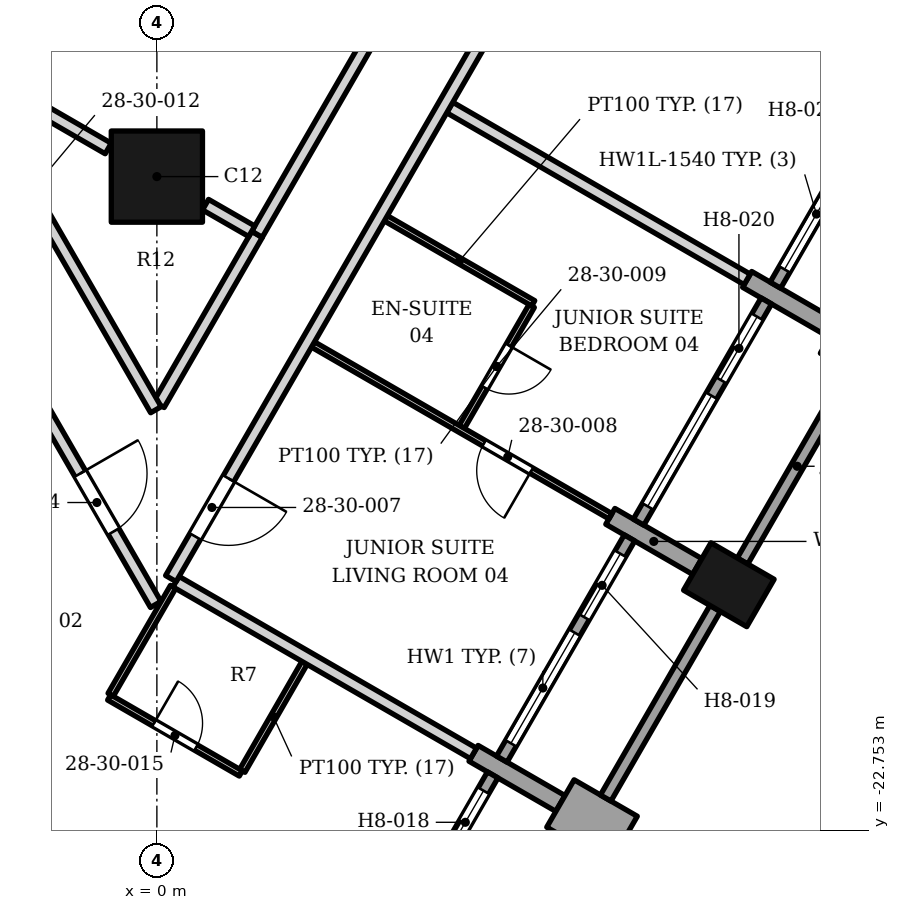
"""IFC4 building model, lengths in metres.
Left out: names, types, materials, properties, quantities, classifications, styles, units other than length and angle.
Written with IfcOpenShell. Run it as: python <this file> out.ifc"""

import sys

from ifc_helpers import new_model, si_unit, direction, frame, frame_2d, origin, origin_2d, place, context, subcontext, project, spatial, rectangle, extrude, element, fill, save


model = new_model("IFC4")
c1 = context("Model", 3, precision=1e-05, world=origin(), true_north=direction((0.0, 1.0)))
c2 = subcontext(c1, "Body", "Model", "MODEL_VIEW")
j1 = project(units=[si_unit("LENGTHUNIT", "METRE"), si_unit("PLANEANGLEUNIT", "RADIAN")], contexts=[c1])
p1 = place(None, origin())
s1 = spatial("IfcSite", under=j1, at=p1, CompositionType="ELEMENT")
p2 = place(p1, origin())
s2 = spatial("IfcBuilding", under=s1, at=p2, CompositionType="ELEMENT")
p3 = place(p2, frame((0.0, 0.0, 122.4)))
s3 = spatial("IfcBuildingStorey", under=s2, at=p3, CompositionType="ELEMENT", Elevation=122.4)
p4 = place(p3, frame((0.0, -12.0, 0.0), z_axis=(0.0, 0.0, 1.0), x_axis=(1.0, 0.0, 0.0)))
e1 = element("IfcColumn", 1, at=p4, inside=s3, PredefinedType="COLUMN", context=c2, shape_type="SweptSolid", body=[
    extrude(rectangle(XDim=1.5, YDim=1.5, at=origin_2d()), origin(), (0.0, 0.0, 1.0), 3.4),
])
p5 = place(p3, frame((9.407, -18.712, 0.0), z_axis=(0.0, 0.0, 1.0), x_axis=(0.5, 0.866025403784, 0.0)))
e2 = element("IfcColumn", 2, at=p5, inside=s3, PredefinedType="COLUMN", context=c2, shape_type="SweptSolid", body=[
    extrude(rectangle(XDim=0.9, YDim=1.2, at=origin_2d()), origin(), (0.0, 0.0, 1.0), 3.4),
])
p6 = place(p3, frame((7.676, -22.909, 0.0), z_axis=(0.0, 0.0, 1.0), x_axis=(-0.866094119867, 0.499880961361, 0.0)))
e3 = element("IfcWall", 3, at=p6, inside=s3, PredefinedType="SOLIDWALL", context=c2, shape_type="SweptSolid", body=[
    extrude(rectangle(XDim=1.2, YDim=0.9, at=frame_2d((0.6, 0.0))), origin(), (0.0, 0.0, 1.0), 2.628),
])
p7 = place(p3, frame((6.637, -22.309, 0.0), z_axis=(0.0, 0.0, 1.0), x_axis=(-0.866040211805, 0.499974350878, 0.0)))
e4 = element("IfcWall", 4, at=p7, inside=s3, PredefinedType="SOLIDWALL", context=c2, shape_type="SweptSolid", body=[
    extrude(rectangle(XDim=1.65, YDim=0.3, at=frame_2d((0.825, 0.0))), origin(), (0.0, 0.0, 1.0), 2.628),
])
p8 = place(p3, frame((8.887, -18.412, 0.0), z_axis=(0.0, 0.0, 1.0), x_axis=(-0.866040211805, 0.499974350878, 0.0)))
e5 = element("IfcWall", 5, at=p8, inside=s3, PredefinedType="SOLIDWALL", context=c2, shape_type="SweptSolid", body=[
    extrude(rectangle(XDim=1.65, YDim=0.3, at=frame_2d((0.825, 0.0))), origin(), (0.0, 0.0, 1.0), 2.65),
])
p9 = place(p3, frame((12.176, -15.115, 0.0), z_axis=(0.0, 0.0, 1.0), x_axis=(-0.866094119867, 0.499880961361, 0.0)))
e6 = element("IfcWall", 6, at=p9, inside=s3, PredefinedType="SOLIDWALL", context=c2, shape_type="SweptSolid", body=[
    extrude(rectangle(XDim=1.2, YDim=0.9, at=frame_2d((0.6, 0.0))), origin(), (0.0, 0.0, 1.0), 2.63),
])
p10 = place(p3, frame((9.708, -13.69, 0.0), z_axis=(0.0, 0.0, 1.0), x_axis=(0.866040211805, -0.499974350878, 0.0)))
e7 = element("IfcWall", 7, at=p10, inside=s3, PredefinedType="SOLIDWALL", context=c2, shape_type="SweptSolid", body=[
    extrude(rectangle(XDim=1.65, YDim=0.3, at=frame_2d((0.825, 0.0))), origin(), (0.0, 0.0, 1.0), 2.65),
])
p11 = place(p3, frame((3.423, -25.477, 0.0), z_axis=(0.0, 0.0, 1.0), x_axis=(0.499958946799, 0.866049104564, 0.0)))
e8 = element("IfcWall", 8, at=p11, inside=s3, PredefinedType="ELEMENTEDWALL", context=c2, shape_type="SweptSolid", body=[
    extrude(rectangle(XDim=4.2, YDim=0.2, at=frame_2d((2.1, 0.0))), origin(), (0.0, 0.0, 1.0), 2.384),
])
p12 = place(p11, frame((0.3, 0.0, 0.6)))
e9 = element("IfcOpeningElement", 9, at=p12, cuts=e8, PredefinedType="OPENING", context=c2, shape_type="SweptSolid", body=[
    extrude(rectangle(XDim=2.1, YDim=1.68, at=frame_2d((1.05, 0.84))), frame((0.0, 0.11, 0.0), z_axis=(0.0, -1.0, 0.0), x_axis=(1.0, 0.0, 0.0)), (0.0, 0.0, 1.0), 0.22),
])
p13 = place(p11, frame((2.7, 0.0, 0.0)))
e10 = element("IfcOpeningElement", 10, at=p13, cuts=e8, PredefinedType="OPENING", context=c2, shape_type="SweptSolid", body=[
    extrude(rectangle(XDim=1.2, YDim=2.28, at=frame_2d((0.6, 1.14))), frame((0.0, 0.11, 0.0), z_axis=(0.0, -1.0, 0.0), x_axis=(1.0, 0.0, 0.0)), (0.0, 0.0, 1.0), 0.22),
])
p14 = place(p3, frame((7.382, -22.219, 0.0), z_axis=(0.0, 0.0, 1.0), x_axis=(0.500012057535, 0.866018442252, 0.0)))
e11 = element("IfcWall", 11, at=p14, inside=s3, PredefinedType="SOLIDWALL", context=c2, shape_type="SweptSolid", body=[
    extrude(rectangle(XDim=3.6, YDim=0.2, at=frame_2d((1.8, 0.0))), origin(), (0.0, 0.0, 1.0), 2.63),
])
p15 = place(p3, frame((5.673, -21.579, 0.0), z_axis=(0.0, 0.0, 1.0), x_axis=(0.49998411664, 0.866034573852, 0.0)))
e12 = element("IfcWall", 12, at=p15, inside=s3, PredefinedType="ELEMENTEDWALL", context=c2, shape_type="SweptSolid", body=[
    extrude(rectangle(XDim=4.2, YDim=0.2, at=frame_2d((2.1, 0.0))), origin(), (0.0, 0.0, 1.0), 2.628),
])
p16 = place(p15, frame((0.3, 0.0, 0.6)))
e13 = element("IfcOpeningElement", 13, at=p16, cuts=e12, PredefinedType="OPENING", context=c2, shape_type="SweptSolid", body=[
    extrude(rectangle(XDim=2.1, YDim=1.8, at=frame_2d((1.05, 0.9))), frame((0.0, 0.11, 0.0), z_axis=(0.0, -1.0, 0.0), x_axis=(1.0, 0.0, 0.0)), (0.0, 0.0, 1.0), 0.22),
])
p17 = place(p15, frame((2.7, 0.0, 0.0)))
e14 = element("IfcOpeningElement", 14, at=p17, cuts=e12, PredefinedType="OPENING", context=c2, shape_type="SweptSolid", body=[
    extrude(rectangle(XDim=1.2, YDim=2.4, at=frame_2d((0.6, 1.2))), frame((0.0, 0.11, 0.0), z_axis=(0.0, -1.0, 0.0), x_axis=(1.0, 0.0, 0.0)), (0.0, 0.0, 1.0), 0.22),
])
p18 = place(p3, frame((9.632, -18.323, 0.0), z_axis=(0.0, 0.0, 1.0), x_axis=(0.500012057535, 0.866018442252, 0.0)))
e15 = element("IfcWall", 15, at=p18, inside=s3, PredefinedType="SOLIDWALL", context=c2, shape_type="SweptSolid", body=[
    extrude(rectangle(XDim=3.6, YDim=0.2, at=frame_2d((1.8, 0.0))), origin(), (0.0, 0.0, 1.0), 2.63),
])
p19 = place(p3, frame((7.923, -17.682, 0.0), z_axis=(0.0, 0.0, 1.0), x_axis=(0.499958946799, 0.866049104564, 0.0)))
e16 = element("IfcWall", 16, at=p19, inside=s3, PredefinedType="ELEMENTEDWALL", context=c2, shape_type="SweptSolid", body=[
    extrude(rectangle(XDim=4.2, YDim=0.2, at=frame_2d((2.1, 0.0))), origin(), (0.0, 0.0, 1.0), 2.65),
])
p20 = place(p19, frame((0.3, 0.0, 0.6)))
e17 = element("IfcOpeningElement", 17, at=p20, cuts=e16, PredefinedType="OPENING", context=c2, shape_type="SweptSolid", body=[
    extrude(rectangle(XDim=2.1, YDim=1.8, at=frame_2d((1.05, 0.9))), frame((0.0, 0.11, 0.0), z_axis=(0.0, -1.0, 0.0), x_axis=(1.0, 0.0, 0.0)), (0.0, 0.0, 1.0), 0.22),
])
p21 = place(p19, frame((2.7, 0.0, 0.0)))
e18 = element("IfcOpeningElement", 18, at=p21, cuts=e16, PredefinedType="OPENING", context=c2, shape_type="SweptSolid", body=[
    extrude(rectangle(XDim=1.2, YDim=2.4, at=frame_2d((0.6, 1.2))), frame((0.0, 0.11, 0.0), z_axis=(0.0, -1.0, 0.0), x_axis=(1.0, 0.0, 0.0)), (0.0, 0.0, 1.0), 0.22),
])
p22 = place(p3, frame((10.173, -13.785, 0.0), z_axis=(0.0, 0.0, 1.0), x_axis=(0.49998411664, 0.866034573852, 0.0)))
e19 = element("IfcWall", 19, at=p22, inside=s3, PredefinedType="ELEMENTEDWALL", context=c2, shape_type="SweptSolid", body=[
    extrude(rectangle(XDim=4.2, YDim=0.2, at=frame_2d((2.1, 0.0))), origin(), (0.0, 0.0, 1.0), 2.242),
])
p23 = place(p22, frame((0.3, 0.0, 0.6)))
e20 = element("IfcOpeningElement", 20, at=p23, cuts=e19, PredefinedType="OPENING", context=c2, shape_type="SweptSolid", body=[
    extrude(rectangle(XDim=2.1, YDim=1.54, at=frame_2d((1.05, 0.77))), frame((0.0, 0.11, 0.0), z_axis=(0.0, -1.0, 0.0), x_axis=(1.0, 0.0, 0.0)), (0.0, 0.0, 1.0), 0.22),
])
p24 = place(p22, frame((2.7, 0.0, 0.0)))
e21 = element("IfcOpeningElement", 21, at=p24, cuts=e19, PredefinedType="OPENING", context=c2, shape_type="SweptSolid", body=[
    extrude(rectangle(XDim=1.2, YDim=2.14, at=frame_2d((0.6, 1.07))), frame((0.0, 0.11, 0.0), z_axis=(0.0, -1.0, 0.0), x_axis=(1.0, 0.0, 0.0)), (0.0, 0.0, 1.0), 0.22),
])
p25 = place(p3, frame((1.405, -21.772, 0.0), z_axis=(0.0, 0.0, 1.0), x_axis=(0.499265284884, 0.866449176415, 0.0)))
e22 = element("IfcWall", 22, at=p25, inside=s3, PredefinedType="PARTITIONING", context=c2, shape_type="SweptSolid", body=[
    extrude(rectangle(XDim=2.05, YDim=0.1, at=frame_2d((1.025, 0.0))), origin(), (0.0, 0.0, 1.0), 2.384),
])
p26 = place(p3, frame((-0.785, -20.565, 0.0), z_axis=(0.0, 0.0, 1.0), x_axis=(0.866022959057, -0.500004234368, 0.0)))
e23 = element("IfcWall", 23, at=p26, inside=s3, PredefinedType="PARTITIONING", context=c2, shape_type="SweptSolid", body=[
    extrude(rectangle(XDim=2.5, YDim=0.1, at=frame_2d((1.25, 0.0))), origin(), (0.0, 0.0, 1.0), 2.474),
])
p27 = place(p26, frame((0.85, 0.0, 0.0)))
e24 = element("IfcOpeningElement", 24, at=p27, cuts=e23, PredefinedType="OPENING", context=c2, shape_type="SweptSolid", body=[
    extrude(rectangle(XDim=0.8, YDim=2.1, at=frame_2d((0.4, 1.05))), frame((0.0, 0.06, 0.0), z_axis=(0.0, -1.0, 0.0), x_axis=(1.0, 0.0, 0.0)), (0.0, 0.0, 1.0), 0.12),
])
p28 = place(p3, frame((-5.405, -9.708, 0.0), z_axis=(0.0, 0.0, 1.0), x_axis=(0.500010215181, -0.866019505967, 0.0)))
e25 = element("IfcWall", 25, at=p28, inside=s3, PredefinedType="PARTITIONING", context=c2, shape_type="SweptSolid", body=[
    extrude(rectangle(XDim=10.771, YDim=0.2, at=frame_2d((5.386, 0.0))), origin(), (0.0, 0.0, 1.0), 2.242),
])
p29 = place(p28, frame((5.0, 0.0, 0.0)))
e26 = element("IfcOpeningElement", 26, at=p29, cuts=e25, PredefinedType="OPENING", context=c2, shape_type="SweptSolid", body=[
    extrude(rectangle(XDim=1.1, YDim=2.1, at=frame_2d((0.55, 1.05))), frame((0.0, 0.11, 0.0), z_axis=(0.0, -1.0, 0.0), x_axis=(1.0, 0.0, 0.0)), (0.0, 0.0, 1.0), 0.22),
])
p30 = place(p28, frame((8.286, 0.0, 0.0)))
e27 = element("IfcOpeningElement", 27, at=p30, cuts=e25, PredefinedType="OPENING", context=c2, shape_type="SweptSolid", body=[
    extrude(rectangle(XDim=1.1, YDim=2.1, at=frame_2d((0.55, 1.05))), frame((0.0, 0.11, 0.0), z_axis=(0.0, -1.0, 0.0), x_axis=(1.0, 0.0, 0.0)), (0.0, 0.0, 1.0), 0.22),
])
p31 = place(p3, frame((-0.76, -20.522, 0.0), z_axis=(0.0, 0.0, 1.0), x_axis=(0.500646589026, 0.865651773461, 0.0)))
e28 = element("IfcWall", 28, at=p31, inside=s3, PredefinedType="PARTITIONING", context=c2, shape_type="SweptSolid", body=[
    extrude(rectangle(XDim=2.05, YDim=0.1, at=frame_2d((1.025, 0.0))), origin(), (0.0, 0.0, 1.0), 2.474),
])
p32 = place(p3, frame((0.314, -18.661, 0.0), z_axis=(0.0, 0.0, 1.0), x_axis=(0.866027263711, -0.4999967785, 0.0)))
e29 = element("IfcWall", 29, at=p32, inside=s3, PredefinedType="PARTITIONING", context=c2, shape_type="SweptSolid", body=[
    extrude(rectangle(XDim=5.649, YDim=0.2, at=frame_2d((2.825, 0.0))), origin(), (0.0, 0.0, 1.0), 2.384),
])
p33 = place(p3, frame((5.014, -16.116, 0.0), z_axis=(0.0, 0.0, 1.0), x_axis=(0.500617411337, 0.865668647617, 0.0)))
e30 = element("IfcWall", 30, at=p33, inside=s3, PredefinedType="PARTITIONING", context=c2, shape_type="SweptSolid", body=[
    extrude(rectangle(XDim=2.298, YDim=0.1, at=frame_2d((1.149, 0.0))), origin(), (0.0, 0.0, 1.0), 3.23),
])
p34 = place(p33, frame((0.748, 0.0, 0.0)))
e31 = element("IfcOpeningElement", 31, at=p34, cuts=e30, PredefinedType="OPENING", context=c2, shape_type="SweptSolid", body=[
    extrude(rectangle(XDim=0.8, YDim=2.1, at=frame_2d((0.4, 1.05))), frame((0.0, 0.06, 0.0), z_axis=(0.0, -1.0, 0.0), x_axis=(1.0, 0.0, 0.0)), (0.0, 0.0, 1.0), 0.12),
])
p35 = place(p3, frame((0.033, -15.748, 0.0), z_axis=(0.0, 0.0, 1.0), x_axis=(0.50002566634, 0.866010584809, 0.0)))
e32 = element("IfcWall", 32, at=p35, inside=s3, PredefinedType="PARTITIONING", context=c2, shape_type="SweptSolid", body=[
    extrude(rectangle(XDim=3.229, YDim=0.2, at=frame_2d((1.615, 0.0))), origin(), (0.0, 0.0, 1.0), 2.474),
])
p36 = place(p3, frame((2.566, -14.76, 0.0), z_axis=(0.0, 0.0, 1.0), x_axis=(0.866019355129, -0.500010476433, 0.0)))
e33 = element("IfcWall", 33, at=p36, inside=s3, PredefinedType="PARTITIONING", context=c2, shape_type="SweptSolid", body=[
    extrude(rectangle(XDim=5.65, YDim=0.1, at=frame_2d((2.825, 0.0))), origin(), (0.0, 0.0, 1.0), 2.384),
])
p37 = place(p36, frame((3.25, 0.0, 0.0)))
e34 = element("IfcOpeningElement", 34, at=p37, cuts=e33, PredefinedType="OPENING", context=c2, shape_type="SweptSolid", body=[
    extrude(rectangle(XDim=0.9, YDim=2.1, at=frame_2d((0.45, 1.05))), frame((0.0, 0.06, 0.0), z_axis=(0.0, -1.0, 0.0), x_axis=(1.0, 0.0, 0.0)), (0.0, 0.0, 1.0), 0.12),
])
p38 = place(p3, frame((3.764, -12.685, 0.0), z_axis=(0.0, 0.0, 1.0), x_axis=(0.866326367614, -0.499478352661, 0.0)))
e35 = element("IfcWall", 35, at=p38, inside=s3, PredefinedType="PARTITIONING", context=c2, shape_type="SweptSolid", body=[
    extrude(rectangle(XDim=2.8, YDim=0.1, at=frame_2d((1.4, 0.0))), origin(), (0.0, 0.0, 1.0), 2.384),
])
p39 = place(p3, frame((1.647, -12.948, 0.0), z_axis=(0.0, 0.0, 1.0), x_axis=(0.500209850425, 0.865904212681, 0.0)))
e36 = element("IfcWall", 36, at=p39, inside=s3, PredefinedType="PARTITIONING", context=c2, shape_type="SweptSolid", body=[
    extrude(rectangle(XDim=8.166, YDim=0.2, at=frame_2d((4.083, 0.0))), origin(), (0.0, 0.0, 1.0), 2.242),
])
p40 = place(p39, frame((3.682, 0.0, 0.0)))
e37 = element("IfcOpeningElement", 37, at=p40, cuts=e36, PredefinedType="OPENING", context=c2, shape_type="SweptSolid", body=[
    extrude(rectangle(XDim=0.9, YDim=2.1, at=frame_2d((0.45, 1.05))), frame((0.0, 0.11, 0.0), z_axis=(0.0, -1.0, 0.0), x_axis=(1.0, 0.0, 0.0)), (0.0, 0.0, 1.0), 0.22),
])
p41 = place(p3, frame((0.8, -12.462, 0.0), z_axis=(0.0, 0.0, 1.0), x_axis=(0.866903294585, -0.498476356347, 0.0)))
e38 = element("IfcWall", 38, at=p41, inside=s3, PredefinedType="PARTITIONING", context=c2, shape_type="SweptSolid", body=[
    extrude(rectangle(XDim=0.877, YDim=0.2, at=frame_2d((0.438, 0.0))), origin(), (0.0, 0.0, 1.0), 3.23),
])
p42 = place(p3, frame((4.816, -10.864, 0.0), z_axis=(0.0, 0.0, 1.0), x_axis=(0.865863825321, -0.500279757735, 0.0)))
e39 = element("IfcWall", 39, at=p42, inside=s3, PredefinedType="PARTITIONING", context=c2, shape_type="SweptSolid", body=[
    extrude(rectangle(XDim=5.65, YDim=0.2, at=frame_2d((2.825, 0.0))), origin(), (0.0, 0.0, 1.0), 2.242),
])
p43 = place(p3, frame((-3.171, -10.168, 0.0), z_axis=(0.0, 0.0, 1.0), x_axis=(0.865863357012, -0.500280568265, 0.0)))
e40 = element("IfcWall", 40, at=p43, inside=s3, PredefinedType="PARTITIONING", context=c2, shape_type="SweptSolid", body=[
    extrude(rectangle(XDim=2.739, YDim=0.2, at=frame_2d((1.369, 0.0))), origin(), (0.0, 0.0, 1.0), 2.242),
])
p44 = place(p3, frame((-5.763, -5.88, 0.0), z_axis=(0.0, 0.0, 1.0), x_axis=(0.500006842847, -0.866021453029, 0.0)))
e41 = element("IfcWall", 41, at=p44, inside=s3, PredefinedType="PARTITIONING", context=c2, shape_type="SweptSolid", body=[
    extrude(rectangle(XDim=11.493, YDim=0.2, at=frame_2d((5.747, 0.0))), origin(), (0.0, 0.0, 1.0), 2.242),
])
p45 = place(p44, frame((6.914, 0.0, 0.0)))
e42 = element("IfcOpeningElement", 42, at=p45, cuts=e41, PredefinedType="OPENING", context=c2, shape_type="SweptSolid", body=[
    extrude(rectangle(XDim=0.9, YDim=2.1, at=frame_2d((0.45, 1.05))), frame((0.0, 0.11, 0.0), z_axis=(0.0, -1.0, 0.0), x_axis=(1.0, 0.0, 0.0)), (0.0, 0.0, 1.0), 0.22),
])
p46 = place(p3, frame((0.23, -18.61, 0.0), z_axis=(0.0, 0.0, 1.0), x_axis=(0.499999197515, 0.866025867099, 0.0)))
e43 = element("IfcWall", 43, at=p46, inside=s3, PredefinedType="PARTITIONING", context=c2, shape_type="SweptSolid", body=[
    extrude(rectangle(XDim=25.76, YDim=0.2, at=frame_2d((12.88, 0.0))), origin(), (0.0, 0.0, 1.0), 2.242),
])
p47 = place(p46, frame((0.8, 0.0, 0.0)))
e44 = element("IfcOpeningElement", 44, at=p47, cuts=e43, PredefinedType="OPENING", context=c2, shape_type="SweptSolid", body=[
    extrude(rectangle(XDim=1.1, YDim=2.1, at=frame_2d((0.55, 1.05))), frame((0.0, 0.11, 0.0), z_axis=(0.0, -1.0, 0.0), x_axis=(1.0, 0.0, 0.0)), (0.0, 0.0, 1.0), 0.22),
])
p48 = place(p46, frame((14.95, 0.0, 0.0)))
e45 = element("IfcOpeningElement", 45, at=p48, cuts=e43, PredefinedType="OPENING", context=c2, shape_type="SweptSolid", body=[
    extrude(rectangle(XDim=1.6, YDim=2.1, at=frame_2d((0.8, 1.05))), frame((0.0, 0.11, 0.0), z_axis=(0.0, -1.0, 0.0), x_axis=(1.0, 0.0, 0.0)), (0.0, 0.0, 1.0), 0.22),
])
p49 = place(p46, frame((23.58, 0.0, 0.0)))
e46 = element("IfcOpeningElement", 46, at=p49, cuts=e43, PredefinedType="OPENING", context=c2, shape_type="SweptSolid", body=[
    extrude(rectangle(XDim=1.1, YDim=2.1, at=frame_2d((0.55, 1.05))), frame((0.0, 0.11, 0.0), z_axis=(0.0, -1.0, 0.0), x_axis=(1.0, 0.0, 0.0)), (0.0, 0.0, 1.0), 0.22),
])
p50 = place(p13, origin())
e47 = element("IfcDoor", 47, at=p50, inside=s3, OperationType="SINGLE_SWING_LEFT", PredefinedType="DOOR", context=c2, shape_type="SweptSolid", body=[
    extrude(rectangle(XDim=1.2, YDim=2.28, at=frame_2d((0.6, 1.14))), frame((0.0, 0.025, 0.0), z_axis=(0.0, -1.0, 0.0), x_axis=(1.0, 0.0, 0.0)), (0.0, 0.0, 1.0), 0.05),
])
fill(e10, e47)
p51 = place(p16, origin())
e48 = element("IfcWindow", 48, at=p51, inside=s3, PartitioningType="SINGLE_PANEL", PredefinedType="WINDOW", context=c2, shape_type="SweptSolid", body=[
    extrude(rectangle(XDim=2.1, YDim=1.8, at=frame_2d((1.05, 0.9))), frame((0.0, 0.03, 0.0), z_axis=(0.0, -1.0, 0.0), x_axis=(1.0, 0.0, 0.0)), (0.0, 0.0, 1.0), 0.06),
])
fill(e13, e48)
p52 = place(p17, origin())
e49 = element("IfcDoor", 49, at=p52, inside=s3, OperationType="SINGLE_SWING_LEFT", PredefinedType="DOOR", context=c2, shape_type="SweptSolid", body=[
    extrude(rectangle(XDim=1.2, YDim=2.4, at=frame_2d((0.6, 1.2))), frame((0.0, 0.025, 0.0), z_axis=(0.0, -1.0, 0.0), x_axis=(1.0, 0.0, 0.0)), (0.0, 0.0, 1.0), 0.05),
])
fill(e14, e49)
p53 = place(p20, origin())
e50 = element("IfcWindow", 50, at=p53, inside=s3, PartitioningType="SINGLE_PANEL", PredefinedType="WINDOW", context=c2, shape_type="SweptSolid", body=[
    extrude(rectangle(XDim=2.1, YDim=1.8, at=frame_2d((1.05, 0.9))), frame((0.0, 0.03, 0.0), z_axis=(0.0, -1.0, 0.0), x_axis=(1.0, 0.0, 0.0)), (0.0, 0.0, 1.0), 0.06),
])
fill(e17, e50)
p54 = place(p21, origin())
e51 = element("IfcDoor", 51, at=p54, inside=s3, OperationType="SINGLE_SWING_LEFT", PredefinedType="DOOR", context=c2, shape_type="SweptSolid", body=[
    extrude(rectangle(XDim=1.2, YDim=2.4, at=frame_2d((0.6, 1.2))), frame((0.0, 0.025, 0.0), z_axis=(0.0, -1.0, 0.0), x_axis=(1.0, 0.0, 0.0)), (0.0, 0.0, 1.0), 0.05),
])
fill(e18, e51)
p55 = place(p23, origin())
e52 = element("IfcWindow", 52, at=p55, inside=s3, PartitioningType="SINGLE_PANEL", PredefinedType="WINDOW", context=c2, shape_type="SweptSolid", body=[
    extrude(rectangle(XDim=2.1, YDim=1.54, at=frame_2d((1.05, 0.77))), frame((0.0, 0.03, 0.0), z_axis=(0.0, -1.0, 0.0), x_axis=(1.0, 0.0, 0.0)), (0.0, 0.0, 1.0), 0.06),
])
fill(e20, e52)
p56 = place(p47, origin())
e53 = element("IfcDoor", 53, at=p56, inside=s3, OperationType="SINGLE_SWING_RIGHT", PredefinedType="DOOR", context=c2, shape_type="SweptSolid", body=[
    extrude(rectangle(XDim=1.1, YDim=2.1, at=frame_2d((0.55, 1.05))), frame((0.0, 0.025, 0.0), z_axis=(0.0, -1.0, 0.0), x_axis=(1.0, 0.0, 0.0)), (0.0, 0.0, 1.0), 0.05),
])
fill(e44, e53)
p57 = place(p37, origin())
e54 = element("IfcDoor", 54, at=p57, inside=s3, OperationType="SINGLE_SWING_RIGHT", PredefinedType="DOOR", context=c2, shape_type="SweptSolid", body=[
    extrude(rectangle(XDim=0.9, YDim=2.1, at=frame_2d((0.45, 1.05))), frame((0.0, 0.025, 0.0), z_axis=(0.0, -1.0, 0.0), x_axis=(1.0, 0.0, 0.0)), (0.0, 0.0, 1.0), 0.05),
])
fill(e34, e54)
p58 = place(p34, origin())
e55 = element("IfcDoor", 55, at=p58, inside=s3, OperationType="SINGLE_SWING_RIGHT", PredefinedType="DOOR", context=c2, shape_type="SweptSolid", body=[
    extrude(rectangle(XDim=0.8, YDim=2.1, at=frame_2d((0.4, 1.05))), frame((0.0, 0.025, 0.0), z_axis=(0.0, -1.0, 0.0), x_axis=(1.0, 0.0, 0.0)), (0.0, 0.0, 1.0), 0.05),
])
fill(e31, e55)
p59 = place(p27, origin())
e56 = element("IfcDoor", 56, at=p59, inside=s3, OperationType="SINGLE_SWING_LEFT", PredefinedType="DOOR", context=c2, shape_type="SweptSolid", body=[
    extrude(rectangle(XDim=0.8, YDim=2.1, at=frame_2d((0.4, 1.05))), frame((0.0, 0.025, 0.0), z_axis=(0.0, -1.0, 0.0), x_axis=(1.0, 0.0, 0.0)), (0.0, 0.0, 1.0), 0.05),
])
fill(e24, e56)
p60 = place(p30, origin())
e57 = element("IfcDoor", 57, at=p60, inside=s3, OperationType="SINGLE_SWING_LEFT", PredefinedType="DOOR", context=c2, shape_type="SweptSolid", body=[
    extrude(rectangle(XDim=1.1, YDim=2.1, at=frame_2d((0.55, 1.05))), frame((0.0, 0.025, 0.0), z_axis=(0.0, -1.0, 0.0), x_axis=(1.0, 0.0, 0.0)), (0.0, 0.0, 1.0), 0.05),
])
fill(e27, e57)
save(model, sys.argv[1])
